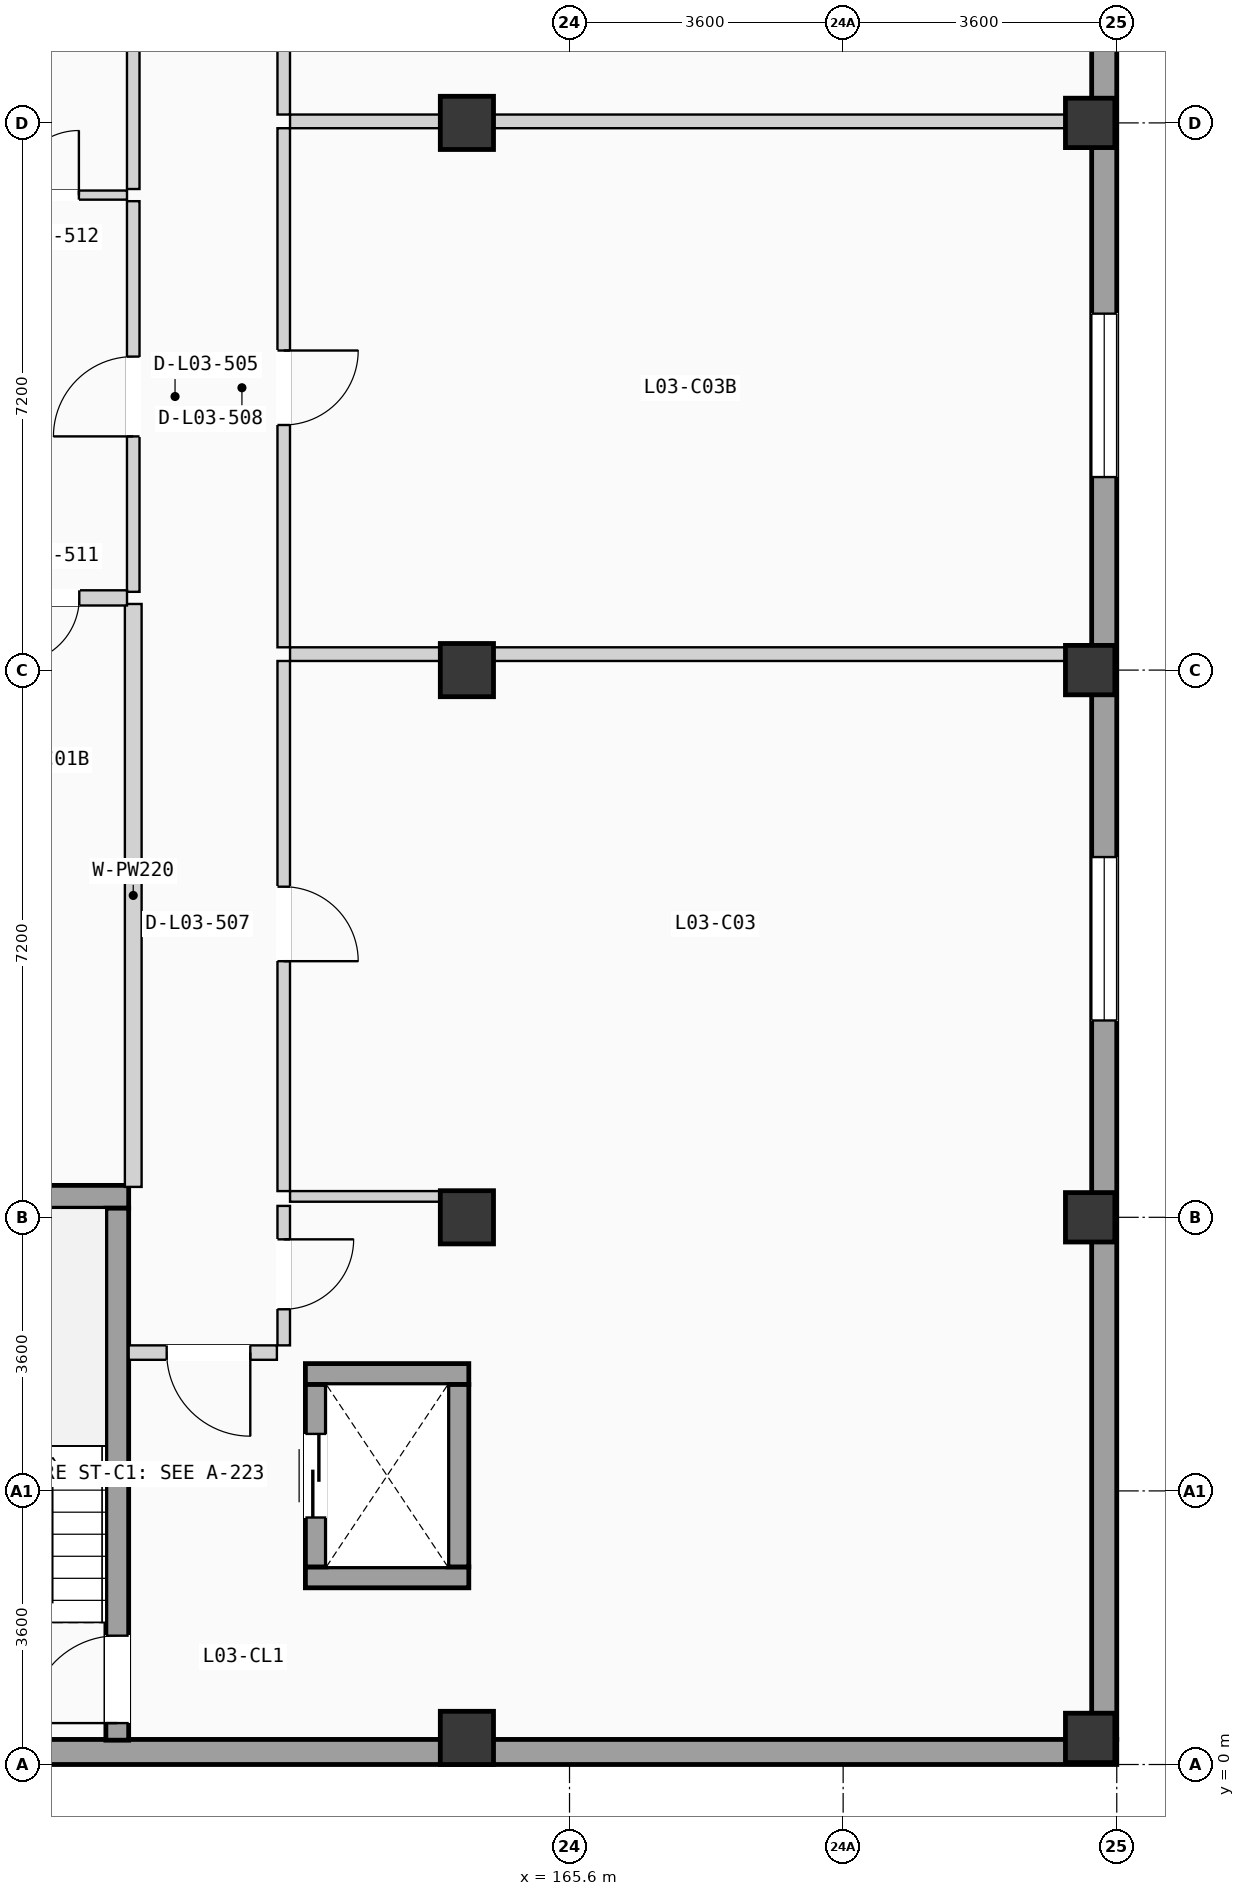
"""IFC4 building model, lengths in metres.
Left out: names, types, materials, properties, quantities, classifications, styles, units other than length and angle.
Written with IfcOpenShell. Run it as: python <this file> out.ifc"""

import sys

from ifc_helpers import new_model, si_unit, direction, frame, frame_2d, origin, origin_2d, place, context, subcontext, project, spatial, rectangle, extrude, element, fill, save


model = new_model("IFC4")
c1 = context("Model", 3, precision=1e-05, world=origin(), true_north=direction((0.0, 1.0)))
c2 = subcontext(c1, "Body", "Model", "MODEL_VIEW")
j1 = project(units=[si_unit("LENGTHUNIT", "METRE"), si_unit("PLANEANGLEUNIT", "RADIAN")], contexts=[c1])
p1 = place(None, origin())
s1 = spatial("IfcSite", under=j1, at=p1, CompositionType="ELEMENT")
p2 = place(p1, origin())
s2 = spatial("IfcBuilding", under=s1, at=p2, CompositionType="ELEMENT")
p3 = place(p2, frame((0.0, 0.0, 12.075)))
s3 = spatial("IfcBuildingStorey", under=s2, at=p3, CompositionType="ELEMENT", Elevation=12.075)
for number, where, z_axis, x_axis in (
    (1, (164.25, 0.35, 0.0), (0.0, 0.0, 1.0), (1.0, 0.0, 0.0)),
    (2, (164.25, 7.2, 0.0), (0.0, 0.0, 1.0), (1.0, 0.0, 0.0)),
    (3, (164.25, 14.4, 0.0), (0.0, 0.0, 1.0), (1.0, 0.0, 0.0)),
    (4, (164.25, 21.6, 0.0), (0.0, 0.0, 1.0), (1.0, 0.0, 0.0)),
):
    element("IfcColumn", number, at=place(p3, frame(where, z_axis=z_axis, x_axis=x_axis)), inside=s3, PredefinedType="COLUMN", context=c2, shape_type="SweptSolid", body=[
        extrude(rectangle(XDim=0.7, YDim=0.7, at=origin_2d()), origin(), (0.0, 0.0, 1.0), 3.15),
    ])
for number, where, z_axis, x_axis in (
    (5, (172.45, 0.35, 0.0), (0.0, 0.0, 1.0), (1.0, 0.0, 0.0)),
    (6, (172.45, 7.2, 0.0), (0.0, 0.0, 1.0), (1.0, 0.0, 0.0)),
    (7, (172.45, 14.4, 0.0), (0.0, 0.0, 1.0), (1.0, 0.0, 0.0)),
    (8, (172.45, 21.6, 0.0), (0.0, 0.0, 1.0), (1.0, 0.0, 0.0)),
):
    element("IfcColumn", number, at=place(p3, frame(where, z_axis=z_axis, x_axis=x_axis)), inside=s3, PredefinedType="COLUMN", context=c2, shape_type="SweptSolid", body=[
        extrude(rectangle(XDim=0.65, YDim=0.65, at=origin_2d()), origin(), (0.0, 0.0, 1.0), 3.15),
    ])
p4 = place(p3, frame((147.6, 0.165, 0.0), z_axis=(0.0, 0.0, 1.0), x_axis=(1.0, 0.0, 0.0)))
e9 = element("IfcWall", 9, at=p4, inside=s3, PredefinedType="SOLIDWALL", context=c2, shape_type="SweptSolid", body=[
    extrude(rectangle(XDim=25.2, YDim=0.33, at=frame_2d((12.6, 0.0))), origin(), (0.0, 0.0, 1.0), 2.89),
])
p5 = place(p3, frame((172.635, 0.33, 0.0), z_axis=(0.0, 0.0, 1.0), x_axis=(0.0, 1.0, 0.0)))
e10 = element("IfcWall", 10, at=p5, inside=s3, PredefinedType="SOLIDWALL", context=c2, shape_type="SweptSolid", body=[
    extrude(rectangle(XDim=49.74, YDim=0.33, at=frame_2d((24.87, 0.0))), origin(), (0.0, 0.0, 1.0), 2.89),
])
p6 = place(p5, frame((9.46, 0.0, 0.705)))
e11 = element("IfcOpeningElement", 11, at=p6, cuts=e10, PredefinedType="OPENING", context=c2, shape_type="SweptSolid", body=[
    extrude(rectangle(XDim=2.15, YDim=1.5, at=frame_2d((1.075, 0.75))), frame((0.0, 0.175, 0.0), z_axis=(0.0, -1.0, 0.0), x_axis=(1.0, 0.0, 0.0)), (0.0, 0.0, 1.0), 0.35),
])
p7 = place(p5, frame((16.61, 0.0, 0.555)))
e12 = element("IfcOpeningElement", 12, at=p7, cuts=e10, PredefinedType="OPENING", context=c2, shape_type="SweptSolid", body=[
    extrude(rectangle(XDim=2.15, YDim=1.65, at=frame_2d((1.075, 0.825))), frame((0.0, 0.175, 0.0), z_axis=(0.0, -1.0, 0.0), x_axis=(1.0, 0.0, 0.0)), (0.0, 0.0, 1.0), 0.35),
])
p8 = place(p5, frame((24.395, 0.0, 0.85)))
e13 = element("IfcOpeningElement", 13, at=p8, cuts=e10, PredefinedType="OPENING", context=c2, shape_type="SweptSolid", body=[
    extrude(rectangle(XDim=0.95, YDim=1.2, at=frame_2d((0.475, 0.6))), frame((0.0, 0.175, 0.0), z_axis=(0.0, -1.0, 0.0), x_axis=(1.0, 0.0, 0.0)), (0.0, 0.0, 1.0), 0.35),
])
p9 = place(p5, frame((33.673, 0.0, 0.85)))
e14 = element("IfcOpeningElement", 14, at=p9, cuts=e10, PredefinedType="OPENING", context=c2, shape_type="SweptSolid", body=[
    extrude(rectangle(XDim=0.95, YDim=1.2, at=frame_2d((0.475, 0.6))), frame((0.0, 0.175, 0.0), z_axis=(0.0, -1.0, 0.0), x_axis=(1.0, 0.0, 0.0)), (0.0, 0.0, 1.0), 0.35),
])
p10 = place(p5, frame((29.589, 0.0, 0.855)))
e15 = element("IfcOpeningElement", 15, at=p10, cuts=e10, PredefinedType="OPENING", context=c2, shape_type="SweptSolid", body=[
    extrude(rectangle(XDim=2.3, YDim=1.35, at=frame_2d((1.15, 0.675))), frame((0.0, 0.175, 0.0), z_axis=(0.0, -1.0, 0.0), x_axis=(1.0, 0.0, 0.0)), (0.0, 0.0, 1.0), 0.35),
])
p11 = place(p5, frame((39.191, 0.0, 0.705)))
e16 = element("IfcOpeningElement", 16, at=p11, cuts=e10, PredefinedType="OPENING", context=c2, shape_type="SweptSolid", body=[
    extrude(rectangle(XDim=2.3, YDim=1.5, at=frame_2d((1.15, 0.75))), frame((0.0, 0.175, 0.0), z_axis=(0.0, -1.0, 0.0), x_axis=(1.0, 0.0, 0.0)), (0.0, 0.0, 1.0), 0.35),
])
p12 = place(p3, frame((156.2, 7.47, 0.0), z_axis=(0.0, 0.0, 1.0), x_axis=(1.0, 0.0, 0.0)))
e17 = element("IfcWall", 17, at=p12, inside=s3, PredefinedType="SHEAR", context=c2, shape_type="SweptSolid", body=[
    extrude(rectangle(XDim=3.6, YDim=0.3, at=frame_2d((1.8, 0.0))), origin(), (0.0, 0.0, 1.0), 2.89),
])
p13 = place(p3, frame((159.65, 0.32, 0.0), z_axis=(0.0, 0.0, 1.0), x_axis=(0.0, 1.0, 0.0)))
e18 = element("IfcWall", 18, at=p13, inside=s3, PredefinedType="SHEAR", context=c2, shape_type="SweptSolid", body=[
    extrude(rectangle(XDim=7.0, YDim=0.3, at=frame_2d((3.5, 0.0))), origin(), (0.0, 0.0, 1.0), 2.89),
])
p14 = place(p13, frame((0.225, 0.0, 0.0)))
e19 = element("IfcOpeningElement", 19, at=p14, cuts=e18, PredefinedType="OPENING", context=c2, shape_type="SweptSolid", body=[
    extrude(rectangle(XDim=1.15, YDim=2.12, at=frame_2d((0.575, 1.06))), frame((0.0, 0.16, 0.0), z_axis=(0.0, -1.0, 0.0), x_axis=(1.0, 0.0, 0.0)), (0.0, 0.0, 1.0), 0.32),
])
for number, where, z_axis, x_axis in (
    (20, (162.125, 2.462, 0.0), (0.0, 0.0, 1.0), (1.0, 0.0, 0.0)),
    (21, (162.125, 5.137, 0.0), (0.0, 0.0, 1.0), (1.0, 0.0, 0.0)),
):
    element("IfcWall", number, at=place(p3, frame(where, z_axis=z_axis, x_axis=x_axis)), inside=s3, PredefinedType="SHEAR", context=c2, shape_type="SweptSolid", body=[
        extrude(rectangle(XDim=2.15, YDim=0.275, at=frame_2d((1.075, 0.0))), origin(), (0.0, 0.0, 1.0), 2.89),
    ])
p15 = place(p3, frame((162.262, 2.6, 0.0), z_axis=(0.0, 0.0, 1.0), x_axis=(0.0, 1.0, 0.0)))
e22 = element("IfcWall", 22, at=p15, inside=s3, PredefinedType="SHEAR", context=c2, shape_type="SweptSolid", body=[
    extrude(rectangle(XDim=2.4, YDim=0.275, at=frame_2d((1.2, 0.0))), origin(), (0.0, 0.0, 1.0), 2.89),
])
p16 = place(p15, frame((0.65, 0.0, 0.0)))
e23 = element("IfcOpeningElement", 23, at=p16, cuts=e22, PredefinedType="OPENING", context=c2, shape_type="SweptSolid", body=[
    extrude(rectangle(XDim=1.1, YDim=2.15, at=frame_2d((0.55, 1.075))), frame((0.0, 0.147, 0.0), z_axis=(0.0, -1.0, 0.0), x_axis=(1.0, 0.0, 0.0)), (0.0, 0.0, 1.0), 0.295),
])
p17 = place(p3, frame((164.137, 2.6, 0.0), z_axis=(0.0, 0.0, 1.0), x_axis=(0.0, 1.0, 0.0)))
e24 = element("IfcWall", 24, at=p17, inside=s3, PredefinedType="SHEAR", context=c2, shape_type="SweptSolid", body=[
    extrude(rectangle(XDim=2.4, YDim=0.275, at=frame_2d((1.2, 0.0))), origin(), (0.0, 0.0, 1.0), 2.89),
])
p18 = place(p3, frame((159.8, 5.42, 0.0), z_axis=(0.0, 0.0, 1.0), x_axis=(1.0, 0.0, 0.0)))
e25 = element("IfcWall", 25, at=p18, inside=s3, PredefinedType="PARTITIONING", context=c2, shape_type="SweptSolid", body=[
    extrude(rectangle(XDim=1.95, YDim=0.19, at=frame_2d((0.975, 0.0))), origin(), (0.0, 0.0, 1.0), 2.87),
])
p19 = place(p18, frame((0.5, 0.0, 0.0)))
e26 = element("IfcOpeningElement", 26, at=p19, cuts=e25, PredefinedType="OPENING", context=c2, shape_type="SweptSolid", body=[
    extrude(rectangle(XDim=1.1, YDim=2.12, at=frame_2d((0.55, 1.06))), frame((0.0, 0.105, 0.0), z_axis=(0.0, -1.0, 0.0), x_axis=(1.0, 0.0, 0.0)), (0.0, 0.0, 1.0), 0.21),
])
p20 = place(p3, frame((161.84, 5.515, 0.0), z_axis=(0.0, 0.0, 1.0), x_axis=(0.0, 1.0, 0.0)))
e27 = element("IfcWall", 27, at=p20, inside=s3, PredefinedType="PARTITIONING", context=c2, shape_type="SweptSolid", body=[
    extrude(rectangle(XDim=1.835, YDim=0.165, at=frame_2d((0.917, 0.0))), origin(), (0.0, 0.0, 1.0), 2.87),
])
p21 = place(p20, frame((0.475, 0.0, 0.0)))
e28 = element("IfcOpeningElement", 28, at=p21, cuts=e27, PredefinedType="OPENING", context=c2, shape_type="SweptSolid", body=[
    extrude(rectangle(XDim=0.92, YDim=2.04, at=frame_2d((0.46, 1.02))), frame((0.0, 0.093, 0.0), z_axis=(0.0, -1.0, 0.0), x_axis=(1.0, 0.0, 0.0)), (0.0, 0.0, 1.0), 0.185),
])
p22 = place(p3, frame((161.923, 7.475, 0.0), z_axis=(0.0, 0.0, 1.0), x_axis=(1.0, 0.0, 0.0)))
e29 = element("IfcWall", 29, at=p22, inside=s3, PredefinedType="PARTITIONING", context=c2, shape_type="SweptSolid", body=[
    extrude(rectangle(XDim=2.127, YDim=0.14, at=frame_2d((1.063, 0.0))), origin(), (0.0, 0.0, 1.0), 2.87),
])
p23 = place(p3, frame((159.86, 15.43, 0.0), z_axis=(0.0, 0.0, 1.0), x_axis=(0.0, 1.0, 0.0)))
e30 = element("IfcWall", 30, at=p23, inside=s3, PredefinedType="PARTITIONING", context=c2, shape_type="SweptSolid", body=[
    extrude(rectangle(XDim=5.14, YDim=0.165, at=frame_2d((2.57, 0.0))), origin(), (0.0, 0.0, 1.0), 2.87),
])
p24 = place(p23, frame((2.045, 0.0, 0.0)))
e31 = element("IfcOpeningElement", 31, at=p24, cuts=e30, PredefinedType="OPENING", context=c2, shape_type="SweptSolid", body=[
    extrude(rectangle(XDim=1.05, YDim=2.13, at=frame_2d((0.525, 1.065))), frame((0.0, 0.093, 0.0), z_axis=(0.0, -1.0, 0.0), x_axis=(1.0, 0.0, 0.0)), (0.0, 0.0, 1.0), 0.185),
])
p25 = place(p3, frame((159.86, 7.6, 0.0), z_axis=(0.0, 0.0, 1.0), x_axis=(0.0, 1.0, 0.0)))
e32 = element("IfcWall", 32, at=p25, inside=s3, PredefinedType="PLUMBINGWALL", context=c2, shape_type="SweptSolid", body=[
    extrude(rectangle(XDim=7.67, YDim=0.22, at=frame_2d((3.835, 0.0))), origin(), (0.0, 0.0, 1.0), 2.87),
])
p26 = place(p3, frame((159.86, 20.73, 0.0), z_axis=(0.0, 0.0, 1.0), x_axis=(0.0, 1.0, 0.0)))
e33 = element("IfcWall", 33, at=p26, inside=s3, PredefinedType="PARTITIONING", context=c2, shape_type="SweptSolid", body=[
    extrude(rectangle(XDim=7.9, YDim=0.165, at=frame_2d((3.95, 0.0))), origin(), (0.0, 0.0, 1.0), 2.87),
])
p27 = place(p3, frame((161.84, 7.545, 0.0), z_axis=(0.0, 0.0, 1.0), x_axis=(0.0, 1.0, 0.0)))
e34 = element("IfcWall", 34, at=p27, inside=s3, PredefinedType="PARTITIONING", context=c2, shape_type="SweptSolid", body=[
    extrude(rectangle(XDim=6.975, YDim=0.165, at=frame_2d((3.488, 0.0))), origin(), (0.0, 0.0, 1.0), 2.87),
])
p28 = place(p27, frame((3.025, 0.0, 0.0)))
e35 = element("IfcOpeningElement", 35, at=p28, cuts=e34, PredefinedType="OPENING", context=c2, shape_type="SweptSolid", body=[
    extrude(rectangle(XDim=0.98, YDim=2.08, at=frame_2d((0.49, 1.04))), frame((0.0, 0.093, 0.0), z_axis=(0.0, -1.0, 0.0), x_axis=(1.0, 0.0, 0.0)), (0.0, 0.0, 1.0), 0.185),
])
p29 = place(p3, frame((161.84, 14.7, 0.0), z_axis=(0.0, 0.0, 1.0), x_axis=(0.0, 1.0, 0.0)))
e36 = element("IfcWall", 36, at=p29, inside=s3, PredefinedType="PARTITIONING", context=c2, shape_type="SweptSolid", body=[
    extrude(rectangle(XDim=6.83, YDim=0.165, at=frame_2d((3.415, 0.0))), origin(), (0.0, 0.0, 1.0), 2.87),
])
p30 = place(p29, frame((2.925, 0.0, 0.0)))
e37 = element("IfcOpeningElement", 37, at=p30, cuts=e36, PredefinedType="OPENING", context=c2, shape_type="SweptSolid", body=[
    extrude(rectangle(XDim=0.98, YDim=2.08, at=frame_2d((0.49, 1.04))), frame((0.0, 0.093, 0.0), z_axis=(0.0, -1.0, 0.0), x_axis=(1.0, 0.0, 0.0)), (0.0, 0.0, 1.0), 0.185),
])
p31 = place(p3, frame((161.84, 21.71, 0.0), z_axis=(0.0, 0.0, 1.0), x_axis=(0.0, 1.0, 0.0)))
e38 = element("IfcWall", 38, at=p31, inside=s3, PredefinedType="PARTITIONING", context=c2, shape_type="SweptSolid", body=[
    extrude(rectangle(XDim=6.92, YDim=0.165, at=frame_2d((3.46, 0.0))), origin(), (0.0, 0.0, 1.0), 2.87),
])
p32 = place(p31, frame((2.97, 0.0, 0.0)))
e39 = element("IfcOpeningElement", 39, at=p32, cuts=e38, PredefinedType="OPENING", context=c2, shape_type="SweptSolid", body=[
    extrude(rectangle(XDim=0.98, YDim=2.08, at=frame_2d((0.49, 1.04))), frame((0.0, 0.093, 0.0), z_axis=(0.0, -1.0, 0.0), x_axis=(1.0, 0.0, 0.0)), (0.0, 0.0, 1.0), 0.185),
])
p33 = place(p3, frame((157.67, 15.35, 0.0), z_axis=(0.0, 0.0, 1.0), x_axis=(1.0, 0.0, 0.0)))
e40 = element("IfcWall", 40, at=p33, inside=s3, PredefinedType="PLUMBINGWALL", context=c2, shape_type="SweptSolid", body=[
    extrude(rectangle(XDim=2.108, YDim=0.2, at=frame_2d((1.054, 0.0))), origin(), (0.0, 0.0, 1.0), 2.87),
])
p34 = place(p33, frame((0.62, 0.0, 0.0)))
e41 = element("IfcOpeningElement", 41, at=p34, cuts=e40, PredefinedType="OPENING", context=c2, shape_type="SweptSolid", body=[
    extrude(rectangle(XDim=0.86, YDim=2.0, at=frame_2d((0.43, 1.0))), frame((0.0, 0.11, 0.0), z_axis=(0.0, -1.0, 0.0), x_axis=(1.0, 0.0, 0.0)), (0.0, 0.0, 1.0), 0.22),
])
p35 = place(p3, frame((157.67, 20.65, 0.0), z_axis=(0.0, 0.0, 1.0), x_axis=(1.0, 0.0, 0.0)))
e42 = element("IfcWall", 42, at=p35, inside=s3, PredefinedType="PARTITIONING", context=c2, shape_type="SweptSolid", body=[
    extrude(rectangle(XDim=2.108, YDim=0.12, at=frame_2d((1.054, 0.0))), origin(), (0.0, 0.0, 1.0), 2.87),
])
p36 = place(p35, frame((0.625, 0.0, 0.0)))
e43 = element("IfcOpeningElement", 43, at=p36, cuts=e42, PredefinedType="OPENING", context=c2, shape_type="SweptSolid", body=[
    extrude(rectangle(XDim=0.85, YDim=2.01, at=frame_2d((0.425, 1.005))), frame((0.0, 0.07, 0.0), z_axis=(0.0, -1.0, 0.0), x_axis=(1.0, 0.0, 0.0)), (0.0, 0.0, 1.0), 0.14),
])
for number, where, z_axis, x_axis in (
    (44, (161.923, 14.61, 0.0), (0.0, 0.0, 1.0), (1.0, 0.0, 0.0)),
    (45, (161.923, 21.62, 0.0), (0.0, 0.0, 1.0), (1.0, 0.0, 0.0)),
):
    element("IfcWall", number, at=place(p3, frame(where, z_axis=z_axis, x_axis=x_axis)), inside=s3, PredefinedType="PARTITIONING", context=c2, shape_type="SweptSolid", body=[
        extrude(rectangle(XDim=10.547, YDim=0.18, at=frame_2d((5.273, 0.0))), origin(), (0.0, 0.0, 1.0), 2.16),
    ])
p37 = place(p6, origin())
e46 = element("IfcWindow", 46, at=p37, inside=s3, PartitioningType="DOUBLE_PANEL_VERTICAL", PredefinedType="WINDOW", context=c2, shape_type="SweptSolid", body=[
    extrude(rectangle(XDim=2.15, YDim=1.5, at=frame_2d((1.075, 0.75))), frame((0.0, 0.03, 0.0), z_axis=(0.0, -1.0, 0.0), x_axis=(1.0, 0.0, 0.0)), (0.0, 0.0, 1.0), 0.06),
])
fill(e11, e46)
p38 = place(p7, origin())
e47 = element("IfcWindow", 47, at=p38, inside=s3, PartitioningType="DOUBLE_PANEL_VERTICAL", PredefinedType="WINDOW", context=c2, shape_type="SweptSolid", body=[
    extrude(rectangle(XDim=2.15, YDim=1.65, at=frame_2d((1.075, 0.825))), frame((0.0, 0.03, 0.0), z_axis=(0.0, -1.0, 0.0), x_axis=(1.0, 0.0, 0.0)), (0.0, 0.0, 1.0), 0.06),
])
fill(e12, e47)
p39 = place(p14, origin())
e48 = element("IfcDoor", 48, at=p39, inside=s3, OperationType="SINGLE_SWING_LEFT", PredefinedType="DOOR", context=c2, shape_type="SweptSolid", body=[
    extrude(rectangle(XDim=1.15, YDim=2.12, at=frame_2d((0.575, 1.06))), frame((0.0, 0.025, 0.0), z_axis=(0.0, -1.0, 0.0), x_axis=(1.0, 0.0, 0.0)), (0.0, 0.0, 1.0), 0.05),
])
fill(e19, e48)
p40 = place(p16, origin())
e49 = element("IfcDoor", 49, at=p40, inside=s3, OperationType="SLIDING_TO_LEFT", PredefinedType="DOOR", context=c2, shape_type="SweptSolid", body=[
    extrude(rectangle(XDim=1.1, YDim=2.15, at=frame_2d((0.55, 1.075))), frame((0.0, 0.025, 0.0), z_axis=(0.0, -1.0, 0.0), x_axis=(1.0, 0.0, 0.0)), (0.0, 0.0, 1.0), 0.05),
])
fill(e23, e49)
p41 = place(p19, frame((1.1, 0.0, 0.0), z_axis=(0.0, 0.0, 1.0), x_axis=(-1.0, 0.0, 0.0)))
e50 = element("IfcDoor", 50, at=p41, inside=s3, OperationType="SINGLE_SWING_RIGHT", PredefinedType="DOOR", context=c2, shape_type="SweptSolid", body=[
    extrude(rectangle(XDim=1.1, YDim=2.12, at=frame_2d((0.55, 1.06))), frame((0.0, 0.025, 0.0), z_axis=(0.0, -1.0, 0.0), x_axis=(1.0, 0.0, 0.0)), (0.0, 0.0, 1.0), 0.05),
])
fill(e26, e50)
p42 = place(p21, frame((0.92, 0.0, 0.0), z_axis=(0.0, 0.0, 1.0), x_axis=(-1.0, 0.0, 0.0)))
e51 = element("IfcDoor", 51, at=p42, inside=s3, OperationType="SINGLE_SWING_RIGHT", PredefinedType="DOOR", context=c2, shape_type="SweptSolid", body=[
    extrude(rectangle(XDim=0.92, YDim=2.04, at=frame_2d((0.46, 1.02))), frame((0.0, 0.025, 0.0), z_axis=(0.0, -1.0, 0.0), x_axis=(1.0, 0.0, 0.0)), (0.0, 0.0, 1.0), 0.05),
])
fill(e28, e51)
p43 = place(p24, origin())
e52 = element("IfcDoor", 52, at=p43, inside=s3, OperationType="SINGLE_SWING_LEFT", PredefinedType="DOOR", context=c2, shape_type="SweptSolid", body=[
    extrude(rectangle(XDim=1.05, YDim=2.13, at=frame_2d((0.525, 1.065))), frame((0.0, 0.025, 0.0), z_axis=(0.0, -1.0, 0.0), x_axis=(1.0, 0.0, 0.0)), (0.0, 0.0, 1.0), 0.05),
])
fill(e31, e52)
p44 = place(p28, frame((0.98, 0.0, 0.0), z_axis=(0.0, 0.0, 1.0), x_axis=(-1.0, 0.0, 0.0)))
e53 = element("IfcDoor", 53, at=p44, inside=s3, OperationType="SINGLE_SWING_LEFT", PredefinedType="DOOR", context=c2, shape_type="SweptSolid", body=[
    extrude(rectangle(XDim=0.98, YDim=2.08, at=frame_2d((0.49, 1.04))), frame((0.0, 0.025, 0.0), z_axis=(0.0, -1.0, 0.0), x_axis=(1.0, 0.0, 0.0)), (0.0, 0.0, 1.0), 0.05),
])
fill(e35, e53)
p45 = place(p30, frame((0.98, 0.0, 0.0), z_axis=(0.0, 0.0, 1.0), x_axis=(-1.0, 0.0, 0.0)))
e54 = element("IfcDoor", 54, at=p45, inside=s3, OperationType="SINGLE_SWING_RIGHT", PredefinedType="DOOR", context=c2, shape_type="SweptSolid", body=[
    extrude(rectangle(XDim=0.98, YDim=2.08, at=frame_2d((0.49, 1.04))), frame((0.0, 0.025, 0.0), z_axis=(0.0, -1.0, 0.0), x_axis=(1.0, 0.0, 0.0)), (0.0, 0.0, 1.0), 0.05),
])
fill(e37, e54)
p46 = place(p34, frame((0.86, 0.0, 0.0), z_axis=(0.0, 0.0, 1.0), x_axis=(-1.0, 0.0, 0.0)))
e55 = element("IfcDoor", 55, at=p46, inside=s3, OperationType="SINGLE_SWING_LEFT", PredefinedType="DOOR", context=c2, shape_type="SweptSolid", body=[
    extrude(rectangle(XDim=0.86, YDim=2.0, at=frame_2d((0.43, 1.0))), frame((0.0, 0.025, 0.0), z_axis=(0.0, -1.0, 0.0), x_axis=(1.0, 0.0, 0.0)), (0.0, 0.0, 1.0), 0.05),
])
fill(e41, e55)
p47 = place(p36, origin())
e56 = element("IfcDoor", 56, at=p47, inside=s3, OperationType="SINGLE_SWING_RIGHT", PredefinedType="DOOR", context=c2, shape_type="SweptSolid", body=[
    extrude(rectangle(XDim=0.85, YDim=2.01, at=frame_2d((0.425, 1.005))), frame((0.0, 0.025, 0.0), z_axis=(0.0, -1.0, 0.0), x_axis=(1.0, 0.0, 0.0)), (0.0, 0.0, 1.0), 0.05),
])
fill(e43, e56)
save(model, sys.argv[1])
